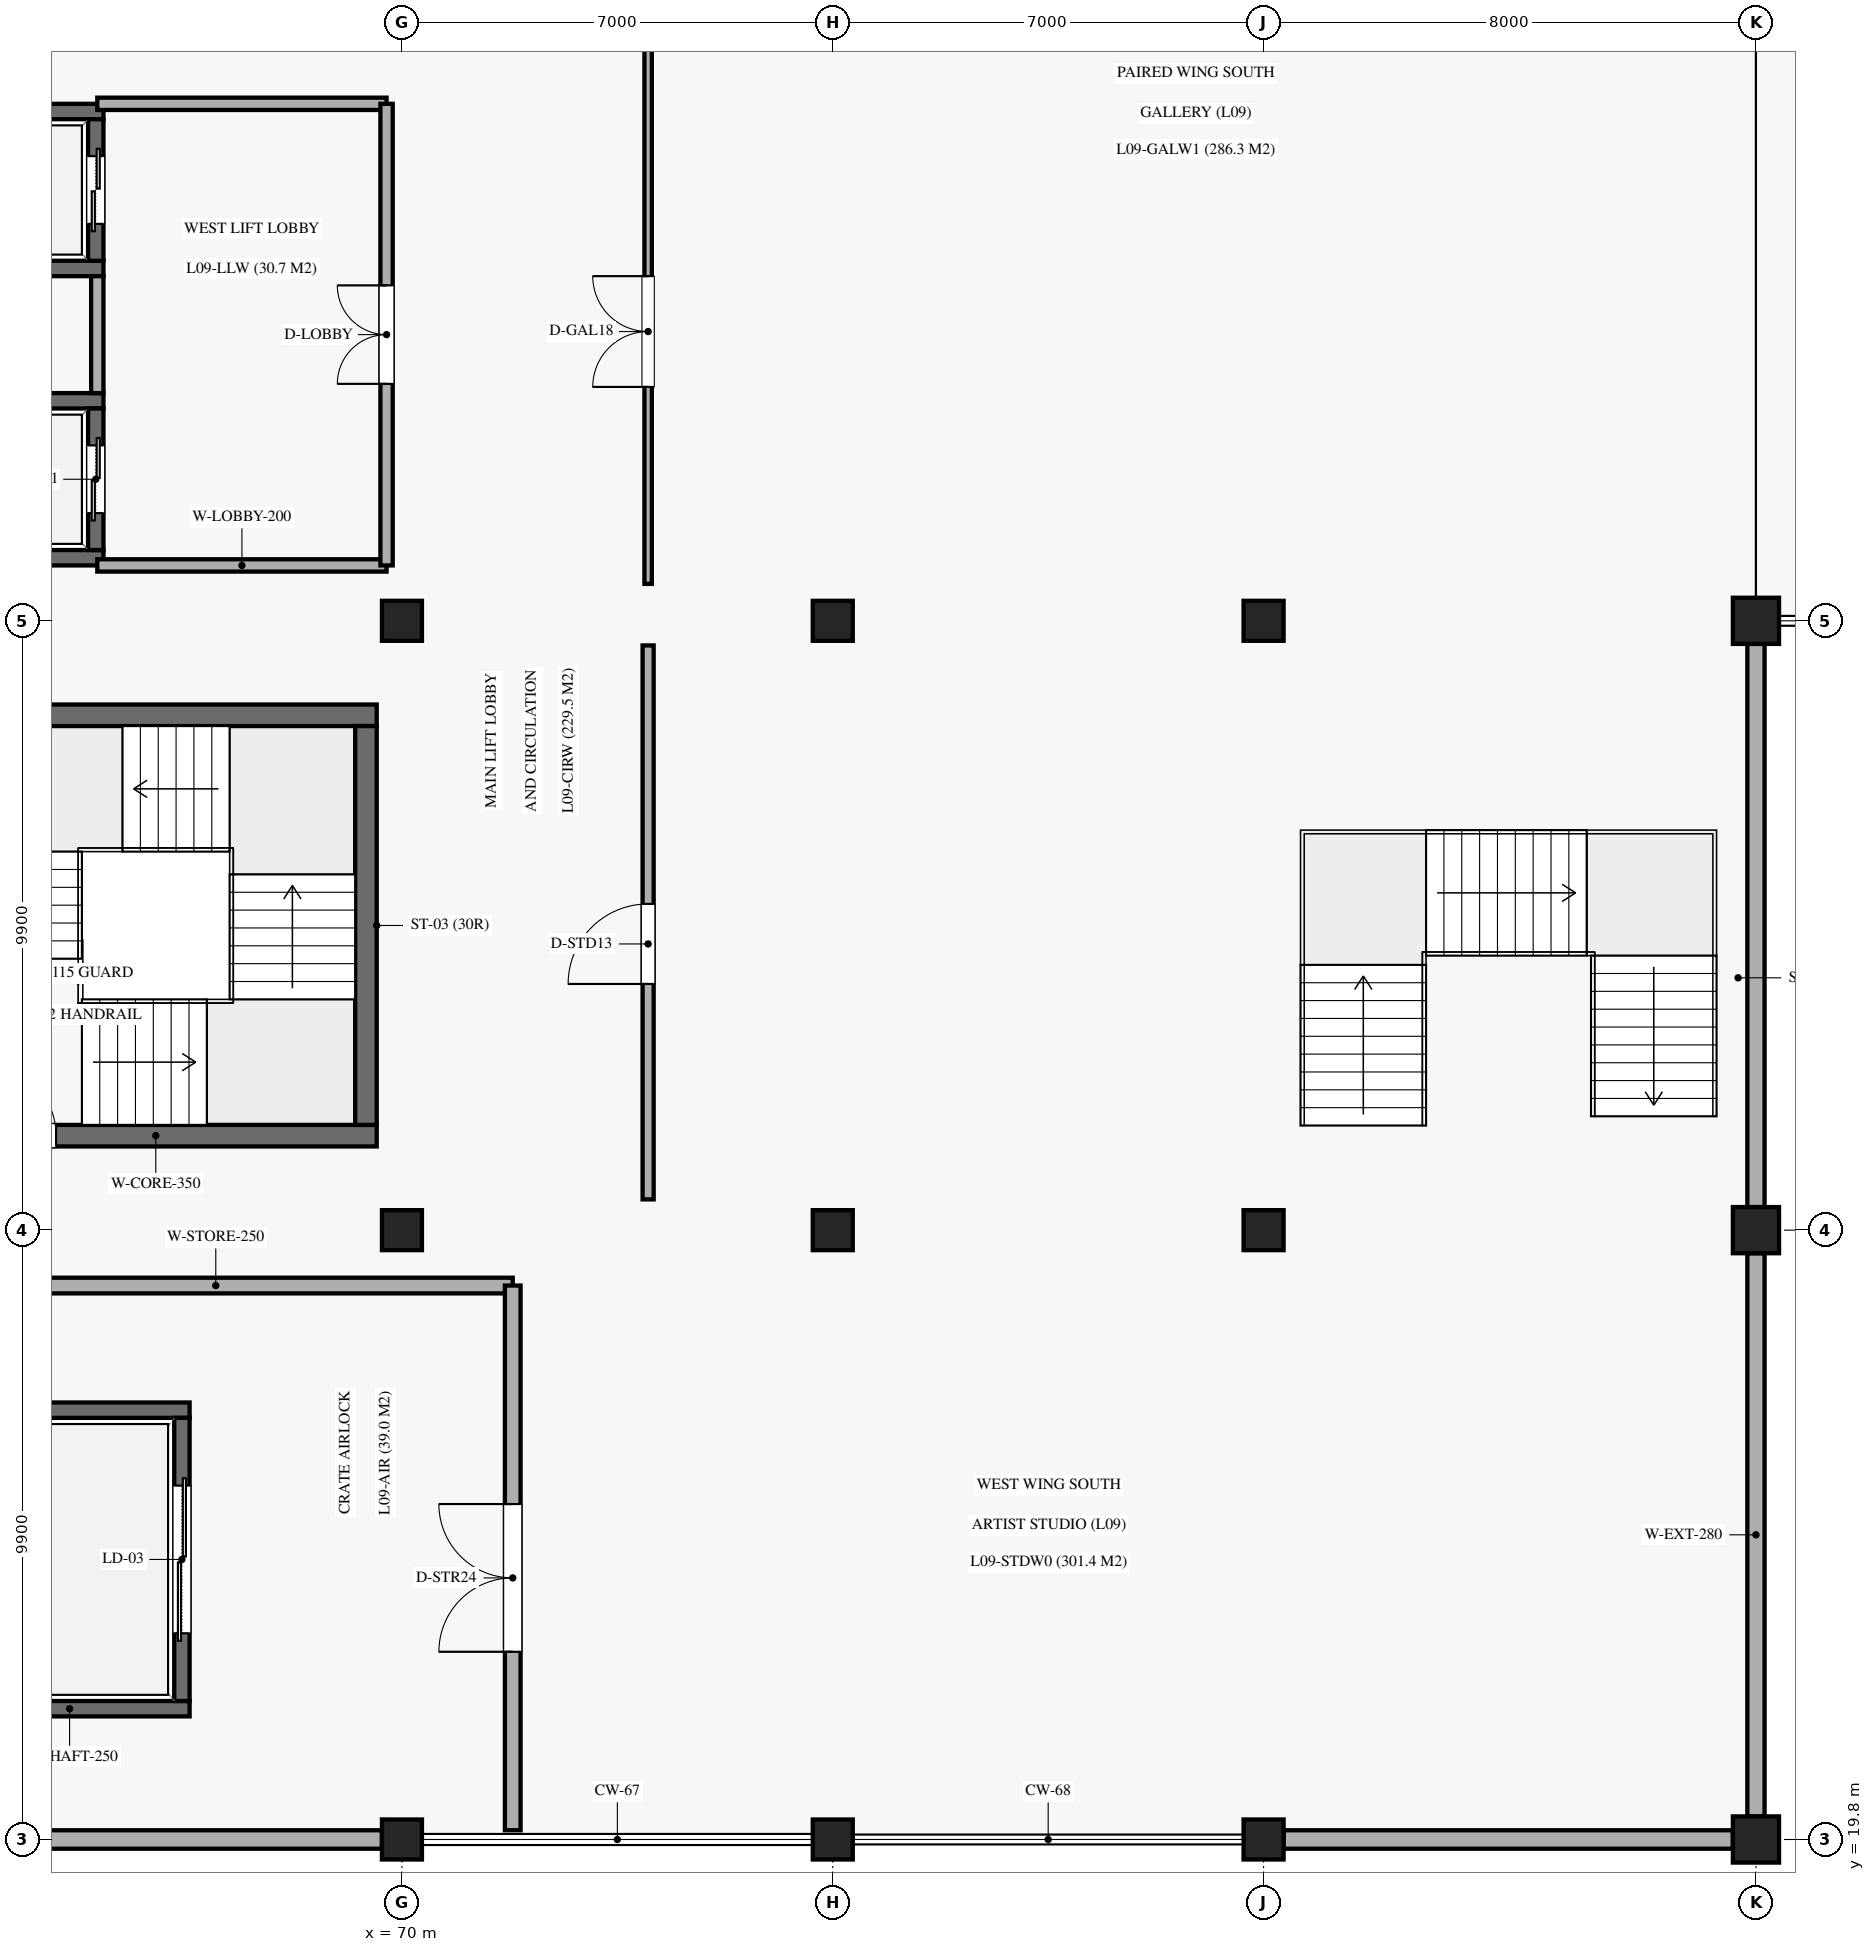
"""IFC4 building model, lengths in metres.
Left out: names, types, materials, properties, quantities, classifications, styles, units other than length and angle.
Written with IfcOpenShell. Run it as: python <this file> out.ifc"""

import sys

from ifc_helpers import new_model, si_unit, direction, frame, frame_2d, origin, origin_2d, place, context, subcontext, project, spatial, rectangle, extrude, element, fill, save


model = new_model("IFC4")
c1 = context("Model", 3, precision=1e-05, world=origin(), true_north=direction((0.0, 1.0)))
c2 = subcontext(c1, "Body", "Model", "MODEL_VIEW")
j1 = project(units=[si_unit("LENGTHUNIT", "METRE"), si_unit("PLANEANGLEUNIT", "RADIAN")], contexts=[c1])
p1 = place(None, origin())
s1 = spatial("IfcSite", under=j1, at=p1, CompositionType="ELEMENT")
p2 = place(p1, origin())
s2 = spatial("IfcBuilding", under=s1, at=p2, CompositionType="ELEMENT")
p3 = place(p2, frame((0.0, 0.0, 46.92)))
s3 = spatial("IfcBuildingStorey", under=s2, at=p3, CompositionType="ELEMENT", Elevation=46.92)
for number, where, z_axis, x_axis in (
    (1, (70.0, 19.8, 0.0), (0.0, 0.0, 1.0), (1.0, 0.0, 0.0)),
    (2, (70.0, 29.7, 0.0), (0.0, 0.0, 1.0), (1.0, 0.0, 0.0)),
    (3, (70.0, 39.6, 0.0), (0.0, 0.0, 1.0), (1.0, 0.0, 0.0)),
    (4, (77.0, 19.8, 0.0), (0.0, 0.0, 1.0), (1.0, 0.0, 0.0)),
    (5, (77.0, 29.7, 0.0), (0.0, 0.0, 1.0), (1.0, 0.0, 0.0)),
    (6, (77.0, 39.6, 0.0), (0.0, 0.0, 1.0), (1.0, 0.0, 0.0)),
    (7, (84.0, 19.8, 0.0), (0.0, 0.0, 1.0), (1.0, 0.0, 0.0)),
    (8, (84.0, 29.7, 0.0), (0.0, 0.0, 1.0), (1.0, 0.0, 0.0)),
    (9, (84.0, 39.6, 0.0), (0.0, 0.0, 1.0), (1.0, 0.0, 0.0)),
):
    element("IfcColumn", number, at=place(p3, frame(where, z_axis=z_axis, x_axis=x_axis)), inside=s3, PredefinedType="COLUMN", context=c2, shape_type="SweptSolid", body=[
        extrude(rectangle(XDim=0.65, YDim=0.65, at=origin_2d()), origin(), (0.0, 0.0, 1.0), 5.1),
    ])
for number, where, z_axis, x_axis in (
    (10, (92.0, 19.8, 0.0), (0.0, 0.0, 1.0), (1.0, 0.0, 0.0)),
    (11, (92.0, 29.7, 0.0), (0.0, 0.0, 1.0), (1.0, 0.0, 0.0)),
    (12, (92.0, 39.6, 0.0), (0.0, 0.0, 1.0), (1.0, 0.0, 0.0)),
):
    element("IfcColumn", number, at=place(p3, frame(where, z_axis=z_axis, x_axis=x_axis)), inside=s3, PredefinedType="COLUMN", context=c2, shape_type="SweptSolid", body=[
        extrude(rectangle(XDim=0.75, YDim=0.75, at=origin_2d()), origin(), (0.0, 0.0, 1.0), 5.1),
    ])
p4 = place(p3, frame((92.0, 20.175, 0.0), z_axis=(0.0, 0.0, 1.0), x_axis=(0.0, 1.0, 0.0)))
e13 = element("IfcWall", 13, at=p4, inside=s3, PredefinedType="SOLIDWALL", context=c2, shape_type="SweptSolid", body=[
    extrude(rectangle(XDim=9.15, YDim=0.28, at=frame_2d((4.575, 0.0))), origin(), (0.0, 0.0, 1.0), 4.1),
])
p5 = place(p3, frame((92.0, 30.075, 0.0), z_axis=(0.0, 0.0, 1.0), x_axis=(0.0, 1.0, 0.0)))
e14 = element("IfcWall", 14, at=p5, inside=s3, PredefinedType="SOLIDWALL", context=c2, shape_type="SweptSolid", body=[
    extrude(rectangle(XDim=9.15, YDim=0.28, at=frame_2d((4.575, 0.0))), origin(), (0.0, 0.0, 1.0), 4.1),
])
for number, where, z_axis, x_axis in (
    (15, (62.375, 19.8, 0.0), (0.0, 0.0, 1.0), (1.0, 0.0, 0.0)),
    (16, (84.325, 19.8, 0.0), (0.0, 0.0, 1.0), (1.0, 0.0, 0.0)),
):
    element("IfcWall", number, at=place(p3, frame(where, z_axis=z_axis, x_axis=x_axis)), inside=s3, PredefinedType="SOLIDWALL", context=c2, shape_type="SweptSolid", body=[
        extrude(rectangle(XDim=7.3, YDim=0.3, at=frame_2d((3.65, 0.0))), origin(), (0.0, 0.0, 1.0), 4.1),
    ])
p6 = place(p3, frame((62.41, 31.235, 0.0), z_axis=(0.0, 0.0, 1.0), x_axis=(1.0, 0.0, 0.0)))
e17 = element("IfcWall", 17, at=p6, inside=s3, PredefinedType="SHEAR", context=c2, shape_type="SweptSolid", body=[
    extrude(rectangle(XDim=7.18, YDim=0.35, at=frame_2d((3.59, 0.0))), origin(), (0.0, 0.0, 1.0), 4.85),
])
p7 = place(p6, frame((0.77, 0.0, 0.0)))
e18 = element("IfcOpeningElement", 18, at=p7, cuts=e17, PredefinedType="OPENING", context=c2, shape_type="SweptSolid", body=[
    extrude(rectangle(XDim=1.2, YDim=2.2, at=frame_2d((0.6, 1.1))), frame((0.0, 0.185, 0.0), z_axis=(0.0, -1.0, 0.0), x_axis=(1.0, 0.0, 0.0)), (0.0, 0.0, 1.0), 0.37),
])
p8 = place(p3, frame((62.41, 38.065, 0.0), z_axis=(0.0, 0.0, 1.0), x_axis=(1.0, 0.0, 0.0)))
e19 = element("IfcWall", 19, at=p8, inside=s3, PredefinedType="SHEAR", context=c2, shape_type="SweptSolid", body=[
    extrude(rectangle(XDim=7.18, YDim=0.35, at=frame_2d((3.59, 0.0))), origin(), (0.0, 0.0, 1.0), 4.85),
])
p9 = place(p3, frame((69.415, 31.41, 0.0), z_axis=(0.0, 0.0, 1.0), x_axis=(0.0, 1.0, 0.0)))
e20 = element("IfcWall", 20, at=p9, inside=s3, PredefinedType="SHEAR", context=c2, shape_type="SweptSolid", body=[
    extrude(rectangle(XDim=6.48, YDim=0.35, at=frame_2d((3.24, 0.0))), origin(), (0.0, 0.0, 1.0), 4.85),
])
for number, where, z_axis, x_axis in (
    (21, (62.65, 40.625, 0.0), (0.0, 0.0, 1.0), (1.0, 0.0, 0.0)),
    (22, (62.65, 43.175, 0.0), (0.0, 0.0, 1.0), (1.0, 0.0, 0.0)),
):
    element("IfcWall", number, at=place(p3, frame(where, z_axis=z_axis, x_axis=x_axis)), inside=s3, PredefinedType="SOLIDWALL", context=c2, shape_type="SweptSolid", body=[
        extrude(rectangle(XDim=2.5, YDim=0.25, at=frame_2d((1.25, 0.0))), origin(), (0.0, 0.0, 1.0), 4.83),
    ])
p10 = place(p3, frame((65.025, 40.75, 0.0), z_axis=(0.0, 0.0, 1.0), x_axis=(0.0, 1.0, 0.0)))
e23 = element("IfcWall", 23, at=p10, inside=s3, PredefinedType="SOLIDWALL", context=c2, shape_type="SweptSolid", body=[
    extrude(rectangle(XDim=2.3, YDim=0.25, at=frame_2d((1.15, 0.0))), origin(), (0.0, 0.0, 1.0), 4.83),
])
p11 = place(p10, frame((0.6, 0.0, 0.0)))
e24 = element("IfcOpeningElement", 24, at=p11, cuts=e23, PredefinedType="OPENING", context=c2, shape_type="SweptSolid", body=[
    extrude(rectangle(XDim=1.1, YDim=2.2, at=frame_2d((0.55, 1.1))), frame((0.0, 0.135, 0.0), z_axis=(0.0, -1.0, 0.0), x_axis=(1.0, 0.0, 0.0)), (0.0, 0.0, 1.0), 0.27),
])
for number, where, z_axis, x_axis in (
    (25, (62.65, 45.325, 0.0), (0.0, 0.0, 1.0), (1.0, 0.0, 0.0)),
    (26, (62.65, 47.875, 0.0), (0.0, 0.0, 1.0), (1.0, 0.0, 0.0)),
):
    element("IfcWall", number, at=place(p3, frame(where, z_axis=z_axis, x_axis=x_axis)), inside=s3, PredefinedType="SOLIDWALL", context=c2, shape_type="SweptSolid", body=[
        extrude(rectangle(XDim=2.5, YDim=0.25, at=frame_2d((1.25, 0.0))), origin(), (0.0, 0.0, 1.0), 4.83),
    ])
p12 = place(p3, frame((65.025, 45.45, 0.0), z_axis=(0.0, 0.0, 1.0), x_axis=(0.0, 1.0, 0.0)))
e27 = element("IfcWall", 27, at=p12, inside=s3, PredefinedType="SOLIDWALL", context=c2, shape_type="SweptSolid", body=[
    extrude(rectangle(XDim=2.3, YDim=0.25, at=frame_2d((1.15, 0.0))), origin(), (0.0, 0.0, 1.0), 4.83),
])
p13 = place(p12, frame((0.6, 0.0, 0.0)))
e28 = element("IfcOpeningElement", 28, at=p13, cuts=e27, PredefinedType="OPENING", context=c2, shape_type="SweptSolid", body=[
    extrude(rectangle(XDim=1.1, YDim=2.2, at=frame_2d((0.55, 1.1))), frame((0.0, 0.135, 0.0), z_axis=(0.0, -1.0, 0.0), x_axis=(1.0, 0.0, 0.0)), (0.0, 0.0, 1.0), 0.27),
])
for number, where, z_axis, x_axis in (
    (29, (62.65, 21.925, 0.0), (0.0, 0.0, 1.0), (1.0, 0.0, 0.0)),
    (30, (62.65, 26.775, 0.0), (0.0, 0.0, 1.0), (1.0, 0.0, 0.0)),
):
    element("IfcWall", number, at=place(p3, frame(where, z_axis=z_axis, x_axis=x_axis)), inside=s3, PredefinedType="SOLIDWALL", context=c2, shape_type="SweptSolid", body=[
        extrude(rectangle(XDim=3.9, YDim=0.25, at=frame_2d((1.95, 0.0))), origin(), (0.0, 0.0, 1.0), 4.83),
    ])
p14 = place(p3, frame((66.425, 22.05, 0.0), z_axis=(0.0, 0.0, 1.0), x_axis=(0.0, 1.0, 0.0)))
e31 = element("IfcWall", 31, at=p14, inside=s3, PredefinedType="SOLIDWALL", context=c2, shape_type="SweptSolid", body=[
    extrude(rectangle(XDim=4.6, YDim=0.25, at=frame_2d((2.3, 0.0))), origin(), (0.0, 0.0, 1.0), 4.83),
])
p15 = place(p14, frame((1.1, 0.0, 0.0)))
e32 = element("IfcOpeningElement", 32, at=p15, cuts=e31, PredefinedType="OPENING", context=c2, shape_type="SweptSolid", body=[
    extrude(rectangle(XDim=2.4, YDim=2.65, at=frame_2d((1.2, 1.325))), frame((0.0, 0.135, 0.0), z_axis=(0.0, -1.0, 0.0), x_axis=(1.0, 0.0, 0.0)), (0.0, 0.0, 1.0), 0.27),
])
for number, where, z_axis, x_axis in (
    (33, (65.05, 40.5, 0.0), (0.0, 0.0, 1.0), (1.0, 0.0, 0.0)),
    (34, (65.05, 48.0, 0.0), (0.0, 0.0, 1.0), (1.0, 0.0, 0.0)),
):
    element("IfcWall", number, at=place(p3, frame(where, z_axis=z_axis, x_axis=x_axis)), inside=s3, PredefinedType="SOLIDWALL", context=c2, shape_type="SweptSolid", body=[
        extrude(rectangle(XDim=4.7, YDim=0.2, at=frame_2d((2.35, 0.0))), origin(), (0.0, 0.0, 1.0), 3.97),
    ])
p16 = place(p3, frame((65.05, 43.3, 0.0), z_axis=(0.0, 0.0, 1.0), x_axis=(0.0, 1.0, 0.0)))
e35 = element("IfcWall", 35, at=p16, inside=s3, PredefinedType="SOLIDWALL", context=c2, shape_type="SweptSolid", body=[
    extrude(rectangle(XDim=1.9, YDim=0.2, at=frame_2d((0.95, 0.0))), origin(), (0.0, 0.0, 1.0), 3.97),
])
p17 = place(p3, frame((69.75, 40.5, 0.0), z_axis=(0.0, 0.0, 1.0), x_axis=(0.0, 1.0, 0.0)))
e36 = element("IfcWall", 36, at=p17, inside=s3, PredefinedType="SOLIDWALL", context=c2, shape_type="SweptSolid", body=[
    extrude(rectangle(XDim=7.5, YDim=0.2, at=frame_2d((3.75, 0.0))), origin(), (0.0, 0.0, 1.0), 3.97),
])
p18 = place(p17, frame((2.95, 0.0, 0.0)))
e37 = element("IfcOpeningElement", 37, at=p18, cuts=e36, PredefinedType="OPENING", context=c2, shape_type="SweptSolid", body=[
    extrude(rectangle(XDim=1.6, YDim=2.2, at=frame_2d((0.8, 1.1))), frame((0.0, 0.11, 0.0), z_axis=(0.0, -1.0, 0.0), x_axis=(1.0, 0.0, 0.0)), (0.0, 0.0, 1.0), 0.22),
])
p19 = place(p3, frame((62.15, 28.8, 0.0), z_axis=(0.0, 0.0, 1.0), x_axis=(1.0, 0.0, 0.0)))
e38 = element("IfcWall", 38, at=p19, inside=s3, PredefinedType="SOLIDWALL", context=c2, shape_type="SweptSolid", body=[
    extrude(rectangle(XDim=9.65, YDim=0.255, at=frame_2d((4.825, 0.0))), origin(), (0.0, 0.0, 1.0), 3.97),
])
p20 = place(p3, frame((71.8, 19.95, 0.0), z_axis=(0.0, 0.0, 1.0), x_axis=(0.0, 1.0, 0.0)))
e39 = element("IfcWall", 39, at=p20, inside=s3, PredefinedType="SOLIDWALL", context=c2, shape_type="SweptSolid", body=[
    extrude(rectangle(XDim=8.85, YDim=0.255, at=frame_2d((4.425, 0.0))), origin(), (0.0, 0.0, 1.0), 3.97),
])
p21 = place(p20, frame((2.9, 0.0, 0.0)))
e40 = element("IfcOpeningElement", 40, at=p21, cuts=e39, PredefinedType="OPENING", context=c2, shape_type="SweptSolid", body=[
    extrude(rectangle(XDim=2.4, YDim=2.5, at=frame_2d((1.2, 1.25))), frame((0.0, 0.137, 0.0), z_axis=(0.0, -1.0, 0.0), x_axis=(1.0, 0.0, 0.0)), (0.0, 0.0, 1.0), 0.275),
])
p22 = place(p3, frame((74.0, 40.2, 0.0), z_axis=(0.0, 0.0, 1.0), x_axis=(0.0, 1.0, 0.0)))
e41 = element("IfcWall", 41, at=p22, inside=s3, PredefinedType="PARTITIONING", context=c2, shape_type="SweptSolid", body=[
    extrude(rectangle(XDim=16.3, YDim=0.12, at=frame_2d((8.15, 0.0))), origin(), (0.0, 0.0, 1.0), 3.97),
])
p23 = place(p22, frame((3.2, 0.0, 0.0)))
e42 = element("IfcOpeningElement", 42, at=p23, cuts=e41, PredefinedType="OPENING", context=c2, shape_type="SweptSolid", body=[
    extrude(rectangle(XDim=1.8, YDim=2.45, at=frame_2d((0.9, 1.225))), frame((0.0, 0.07, 0.0), z_axis=(0.0, -1.0, 0.0), x_axis=(1.0, 0.0, 0.0)), (0.0, 0.0, 1.0), 0.14),
])
p24 = place(p3, frame((74.0, 30.2, 0.0), z_axis=(0.0, 0.0, 1.0), x_axis=(0.0, 1.0, 0.0)))
e43 = element("IfcWall", 43, at=p24, inside=s3, PredefinedType="PARTITIONING", context=c2, shape_type="SweptSolid", body=[
    extrude(rectangle(XDim=9.0, YDim=0.18, at=frame_2d((4.5, 0.0))), origin(), (0.0, 0.0, 1.0), 3.97),
])
p25 = place(p24, frame((3.5, 0.0, 0.0)))
e44 = element("IfcOpeningElement", 44, at=p25, cuts=e43, PredefinedType="OPENING", context=c2, shape_type="SweptSolid", body=[
    extrude(rectangle(XDim=1.3, YDim=2.25, at=frame_2d((0.65, 1.125))), frame((0.0, 0.1, 0.0), z_axis=(0.0, -1.0, 0.0), x_axis=(1.0, 0.0, 0.0)), (0.0, 0.0, 1.0), 0.2),
])
p26 = place(p7, origin())
e45 = element("IfcDoor", 45, at=p26, inside=s3, OperationType="SINGLE_SWING_LEFT", PredefinedType="DOOR", context=c2, shape_type="SweptSolid", body=[
    extrude(rectangle(XDim=1.2, YDim=2.2, at=frame_2d((0.6, 1.1))), frame((0.0, 0.025, 0.0), z_axis=(0.0, -1.0, 0.0), x_axis=(1.0, 0.0, 0.0)), (0.0, 0.0, 1.0), 0.05),
])
fill(e18, e45)
p27 = place(p11, origin())
e46 = element("IfcDoor", 46, at=p27, inside=s3, OperationType="DOUBLE_DOOR_SLIDING", PredefinedType="DOOR", context=c2, shape_type="SweptSolid", body=[
    extrude(rectangle(XDim=1.1, YDim=2.2, at=frame_2d((0.55, 1.1))), frame((0.0, 0.025, 0.0), z_axis=(0.0, -1.0, 0.0), x_axis=(1.0, 0.0, 0.0)), (0.0, 0.0, 1.0), 0.05),
])
fill(e24, e46)
p28 = place(p13, origin())
e47 = element("IfcDoor", 47, at=p28, inside=s3, OperationType="DOUBLE_DOOR_SLIDING", PredefinedType="DOOR", context=c2, shape_type="SweptSolid", body=[
    extrude(rectangle(XDim=1.1, YDim=2.2, at=frame_2d((0.55, 1.1))), frame((0.0, 0.025, 0.0), z_axis=(0.0, -1.0, 0.0), x_axis=(1.0, 0.0, 0.0)), (0.0, 0.0, 1.0), 0.05),
])
fill(e28, e47)
p29 = place(p15, origin())
e48 = element("IfcDoor", 48, at=p29, inside=s3, OperationType="DOUBLE_DOOR_SLIDING", PredefinedType="DOOR", context=c2, shape_type="SweptSolid", body=[
    extrude(rectangle(XDim=2.4, YDim=2.65, at=frame_2d((1.2, 1.325))), frame((0.0, 0.025, 0.0), z_axis=(0.0, -1.0, 0.0), x_axis=(1.0, 0.0, 0.0)), (0.0, 0.0, 1.0), 0.05),
])
fill(e32, e48)
p30 = place(p18, origin())
e49 = element("IfcDoor", 49, at=p30, inside=s3, OperationType="DOUBLE_DOOR_SINGLE_SWING", PredefinedType="DOOR", context=c2, shape_type="SweptSolid", body=[
    extrude(rectangle(XDim=1.6, YDim=2.2, at=frame_2d((0.8, 1.1))), frame((0.0, 0.025, 0.0), z_axis=(0.0, -1.0, 0.0), x_axis=(1.0, 0.0, 0.0)), (0.0, 0.0, 1.0), 0.05),
])
fill(e37, e49)
p31 = place(p21, origin())
e50 = element("IfcDoor", 50, at=p31, inside=s3, OperationType="DOUBLE_DOOR_SINGLE_SWING", PredefinedType="DOOR", context=c2, shape_type="SweptSolid", body=[
    extrude(rectangle(XDim=2.4, YDim=2.5, at=frame_2d((1.2, 1.25))), frame((0.0, 0.025, 0.0), z_axis=(0.0, -1.0, 0.0), x_axis=(1.0, 0.0, 0.0)), (0.0, 0.0, 1.0), 0.05),
])
fill(e40, e50)
p32 = place(p23, origin())
e51 = element("IfcDoor", 51, at=p32, inside=s3, OperationType="DOUBLE_DOOR_SINGLE_SWING", PredefinedType="DOOR", context=c2, shape_type="SweptSolid", body=[
    extrude(rectangle(XDim=1.8, YDim=2.45, at=frame_2d((0.9, 1.225))), frame((0.0, 0.025, 0.0), z_axis=(0.0, -1.0, 0.0), x_axis=(1.0, 0.0, 0.0)), (0.0, 0.0, 1.0), 0.05),
])
fill(e42, e51)
p33 = place(p25, origin())
e52 = element("IfcDoor", 52, at=p33, inside=s3, OperationType="SINGLE_SWING_LEFT", PredefinedType="DOOR", context=c2, shape_type="SweptSolid", body=[
    extrude(rectangle(XDim=1.3, YDim=2.25, at=frame_2d((0.65, 1.125))), frame((0.0, 0.025, 0.0), z_axis=(0.0, -1.0, 0.0), x_axis=(1.0, 0.0, 0.0)), (0.0, 0.0, 1.0), 0.05),
])
fill(e44, e52)
save(model, sys.argv[1])
